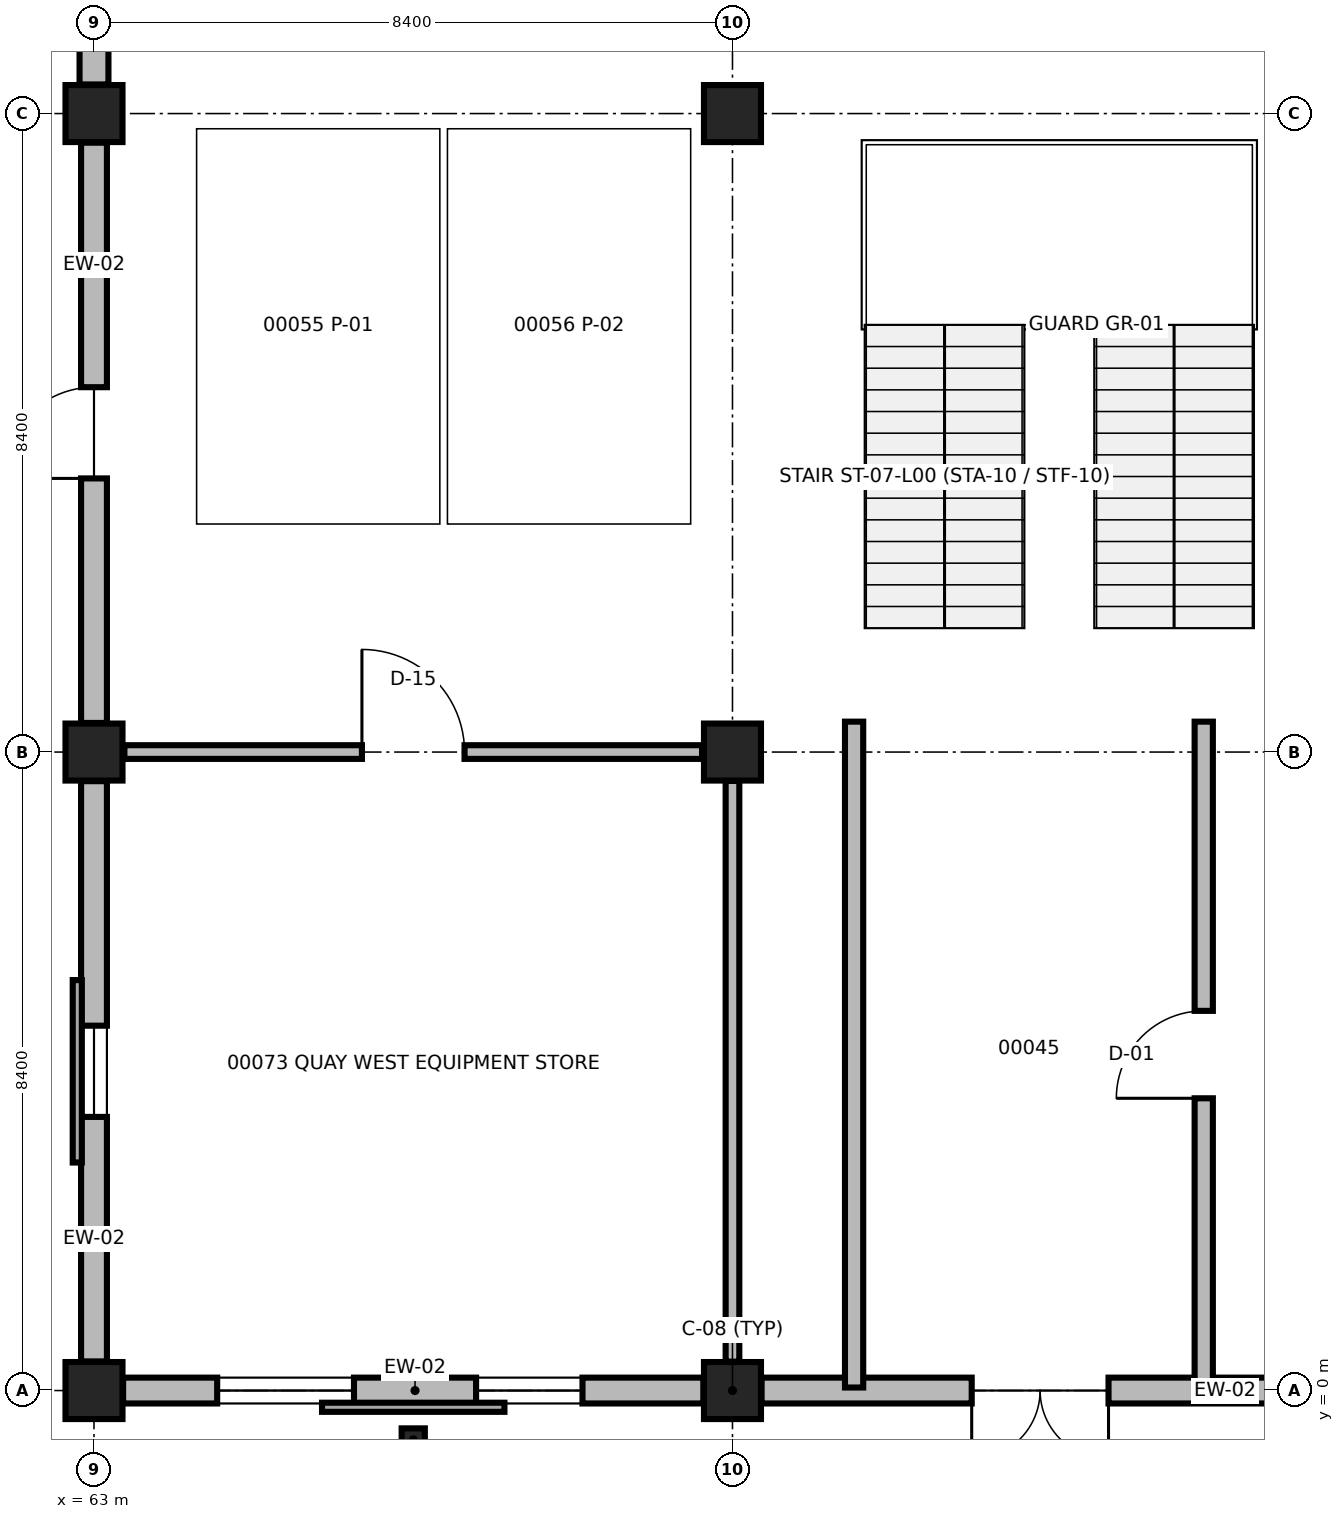
"""IFC4 building model, lengths in metres.
Left out: names, types, materials, properties, quantities, classifications, styles, units other than length and angle.
Written with IfcOpenShell. Run it as: python <this file> out.ifc"""

import sys

from ifc_helpers import new_model, si_unit, direction, frame, frame_2d, origin, origin_2d, place, context, subcontext, project, spatial, rectangle, hollow_rectangle, extrude, element, fill, save


model = new_model("IFC4")
c1 = context("Model", 3, precision=1e-05, world=origin(), true_north=direction((0.0, 1.0)))
c2 = subcontext(c1, "Body", "Model", "MODEL_VIEW")
j1 = project(units=[si_unit("LENGTHUNIT", "METRE"), si_unit("PLANEANGLEUNIT", "RADIAN")], contexts=[c1])
p1 = place(None, origin())
s1 = spatial("IfcSite", under=j1, at=p1, CompositionType="ELEMENT")
p2 = place(p1, origin())
s2 = spatial("IfcBuilding", under=s1, at=p2, CompositionType="ELEMENT")
p3 = place(p2, origin())
s3 = spatial("IfcBuildingStorey", under=s2, at=p3, CompositionType="ELEMENT", Elevation=0.0)
for number, where, z_axis, x_axis in (
    (1, (63.0, 0.0, 0.0), (0.0, 0.0, 1.0), (1.0, 0.0, 0.0)),
    (2, (63.0, 8.4, 0.0), (0.0, 0.0, 1.0), (1.0, 0.0, 0.0)),
    (3, (63.0, 16.8, 0.0), (0.0, 0.0, 1.0), (1.0, 0.0, 0.0)),
    (4, (71.4, 0.0, 0.0), (0.0, 0.0, 1.0), (1.0, 0.0, 0.0)),
    (5, (71.4, 8.4, 0.0), (0.0, 0.0, 1.0), (1.0, 0.0, 0.0)),
    (6, (71.4, 16.8, 0.0), (0.0, 0.0, 1.0), (1.0, 0.0, 0.0)),
):
    element("IfcColumn", number, at=place(p3, frame(where, z_axis=z_axis, x_axis=x_axis)), inside=s3, PredefinedType="COLUMN", context=c2, shape_type="SweptSolid", body=[
        extrude(rectangle(XDim=0.75, YDim=0.75, at=origin_2d()), origin(), (0.0, 0.0, 1.0), 5.1),
    ])
p4 = place(p3, frame((67.2, -0.65, 0.0), z_axis=(0.0, 0.0, 1.0), x_axis=(1.0, 0.0, 0.0)))
e7 = element("IfcColumn", 7, at=p4, inside=s3, PredefinedType="PILASTER", context=c2, shape_type="SweptSolid", body=[
    extrude(hollow_rectangle(XDim=0.305, YDim=0.305, WallThickness=0.015, at=origin_2d()), origin(), (0.0, 0.0, 1.0), 5.1),
])
p5 = place(p3, frame((71.017, 0.0, 0.0), z_axis=(0.0, 0.0, 1.0), x_axis=(-1.0, 0.0, 0.0)))
e8 = element("IfcWall", 8, at=p5, inside=s3, PredefinedType="SOLIDWALL", context=c2, shape_type="SweptSolid", body=[
    extrude(rectangle(XDim=7.634, YDim=0.34, at=frame_2d((3.817, 0.0))), origin(), (0.0, 0.0, 1.0), 4.246),
])
p6 = place(p5, frame((1.59, 0.0, 1.3)))
e9 = element("IfcOpeningElement", 9, at=p6, cuts=e8, PredefinedType="OPENING", context=c2, shape_type="SweptSolid", body=[
    extrude(rectangle(XDim=1.4, YDim=1.45, at=frame_2d((0.7, 0.725))), frame((0.0, 0.18, 0.0), z_axis=(0.0, -1.0, 0.0), x_axis=(1.0, 0.0, 0.0)), (0.0, 0.0, 1.0), 0.36),
])
p7 = place(p5, frame((4.596, 0.0, 1.3)))
e10 = element("IfcOpeningElement", 10, at=p7, cuts=e8, PredefinedType="OPENING", context=c2, shape_type="SweptSolid", body=[
    extrude(rectangle(XDim=1.8, YDim=1.75, at=frame_2d((0.9, 0.875))), frame((0.0, 0.18, 0.0), z_axis=(0.0, -1.0, 0.0), x_axis=(1.0, 0.0, 0.0)), (0.0, 0.0, 1.0), 0.36),
])
p8 = place(p3, frame((79.417, 0.0, 0.0), z_axis=(0.0, 0.0, 1.0), x_axis=(-1.0, 0.0, 0.0)))
e11 = element("IfcWall", 11, at=p8, inside=s3, PredefinedType="SOLIDWALL", context=c2, shape_type="SweptSolid", body=[
    extrude(rectangle(XDim=7.634, YDim=0.34, at=frame_2d((3.817, 0.0))), origin(), (0.0, 0.0, 1.0), 4.226),
])
p9 = place(p8, frame((3.07, 0.0, 0.0)))
e12 = element("IfcOpeningElement", 12, at=p9, cuts=e11, PredefinedType="OPENING", context=c2, shape_type="SweptSolid", body=[
    extrude(rectangle(XDim=1.8, YDim=2.4, at=frame_2d((0.9, 1.2))), frame((0.0, 0.18, 0.0), z_axis=(0.0, -1.0, 0.0), x_axis=(1.0, 0.0, 0.0)), (0.0, 0.0, 1.0), 0.36),
])
p10 = place(p3, frame((63.0, 0.383, 0.0), z_axis=(0.0, 0.0, 1.0), x_axis=(0.0, 1.0, 0.0)))
e13 = element("IfcWall", 13, at=p10, inside=s3, PredefinedType="SOLIDWALL", context=c2, shape_type="SweptSolid", body=[
    extrude(rectangle(XDim=7.634, YDim=0.34, at=frame_2d((3.817, 0.0))), origin(), (0.0, 0.0, 1.0), 4.246),
])
p11 = place(p10, frame((3.217, 0.0, 1.25)))
e14 = element("IfcOpeningElement", 14, at=p11, cuts=e13, PredefinedType="OPENING", context=c2, shape_type="SweptSolid", body=[
    extrude(rectangle(XDim=1.2, YDim=1.75, at=frame_2d((0.6, 0.875))), frame((0.0, 0.18, 0.0), z_axis=(0.0, -1.0, 0.0), x_axis=(1.0, 0.0, 0.0)), (0.0, 0.0, 1.0), 0.36),
])
p12 = place(p3, frame((63.0, 8.783, 0.0), z_axis=(0.0, 0.0, 1.0), x_axis=(0.0, 1.0, 0.0)))
e15 = element("IfcWall", 15, at=p12, inside=s3, PredefinedType="SOLIDWALL", context=c2, shape_type="SweptSolid", body=[
    extrude(rectangle(XDim=7.634, YDim=0.34, at=frame_2d((3.817, 0.0))), origin(), (0.0, 0.0, 1.0), 4.246),
])
p13 = place(p12, frame((3.217, 0.0, 0.0)))
e16 = element("IfcOpeningElement", 16, at=p13, cuts=e15, PredefinedType="OPENING", context=c2, shape_type="SweptSolid", body=[
    extrude(rectangle(XDim=1.2, YDim=2.25, at=frame_2d((0.6, 1.125))), frame((0.0, 0.18, 0.0), z_axis=(0.0, -1.0, 0.0), x_axis=(1.0, 0.0, 0.0)), (0.0, 0.0, 1.0), 0.36),
])
p14 = place(p3, frame((63.0, 17.183, 0.0), z_axis=(0.0, 0.0, 1.0), x_axis=(0.0, 1.0, 0.0)))
e17 = element("IfcWall", 17, at=p14, inside=s3, PredefinedType="SOLIDWALL", context=c2, shape_type="SweptSolid", body=[
    extrude(rectangle(XDim=7.793, YDim=0.38, at=frame_2d((3.897, 0.0))), origin(), (0.0, 0.0, 1.0), 4.246),
])
p15 = place(p14, frame((1.297, 0.0, 0.0)))
e18 = element("IfcOpeningElement", 18, at=p15, cuts=e17, PredefinedType="OPENING", context=c2, shape_type="SweptSolid", body=[
    extrude(rectangle(XDim=5.2, YDim=3.85, at=frame_2d((2.6, 1.925))), frame((0.0, 0.2, 0.0), z_axis=(0.0, -1.0, 0.0), x_axis=(1.0, 0.0, 0.0)), (0.0, 0.0, 1.0), 0.4),
])
p16 = place(p3, frame((63.4, 8.4, 0.0), z_axis=(0.0, 0.0, 1.0), x_axis=(1.0, 0.0, 0.0)))
e19 = element("IfcWall", 19, at=p16, inside=s3, PredefinedType="PARTITIONING", context=c2, shape_type="SweptSolid", body=[
    extrude(rectangle(XDim=7.6, YDim=0.18, at=frame_2d((3.8, 0.0))), origin(), (0.0, 0.0, 1.0), 3.77),
])
p17 = place(p16, frame((3.125, 0.0, 0.0)))
e20 = element("IfcOpeningElement", 20, at=p17, cuts=e19, PredefinedType="OPENING", context=c2, shape_type="SweptSolid", body=[
    extrude(rectangle(XDim=1.35, YDim=2.2, at=frame_2d((0.675, 1.1))), frame((0.0, 0.1, 0.0), z_axis=(0.0, -1.0, 0.0), x_axis=(1.0, 0.0, 0.0)), (0.0, 0.0, 1.0), 0.2),
])
p18 = place(p3, frame((73.0, 0.04, 0.0), z_axis=(0.0, 0.0, 1.0), x_axis=(0.0, 1.0, 0.0)))
e21 = element("IfcWall", 21, at=p18, inside=s3, PredefinedType="SOLIDWALL", context=c2, shape_type="SweptSolid", body=[
    extrude(rectangle(XDim=8.76, YDim=0.24, at=frame_2d((4.38, 0.0))), origin(), (0.0, 0.0, 1.0), 3.77),
])
p19 = place(p3, frame((77.6, 0.04, 0.0), z_axis=(0.0, 0.0, 1.0), x_axis=(0.0, 1.0, 0.0)))
e22 = element("IfcWall", 22, at=p19, inside=s3, PredefinedType="SOLIDWALL", context=c2, shape_type="SweptSolid", body=[
    extrude(rectangle(XDim=8.76, YDim=0.24, at=frame_2d((4.38, 0.0))), origin(), (0.0, 0.0, 1.0), 3.77),
])
p20 = place(p19, frame((3.805, 0.0, 0.0)))
e23 = element("IfcOpeningElement", 23, at=p20, cuts=e22, PredefinedType="OPENING", context=c2, shape_type="SweptSolid", body=[
    extrude(rectangle(XDim=1.15, YDim=2.15, at=frame_2d((0.575, 1.075))), frame((0.0, 0.13, 0.0), z_axis=(0.0, -1.0, 0.0), x_axis=(1.0, 0.0, 0.0)), (0.0, 0.0, 1.0), 0.26),
])
p21 = place(p3, frame((71.4, 0.38, 0.0), z_axis=(0.0, 0.0, 1.0), x_axis=(0.0, 1.0, 0.0)))
e24 = element("IfcWall", 24, at=p21, inside=s3, PredefinedType="PARTITIONING", context=c2, shape_type="SweptSolid", body=[
    extrude(rectangle(XDim=7.64, YDim=0.18, at=frame_2d((3.82, 0.0))), origin(), (0.0, 0.0, 1.0), 4.226),
])
p22 = place(p6, origin())
e25 = element("IfcWindow", 25, at=p22, inside=s3, PartitioningType="SINGLE_PANEL", PredefinedType="WINDOW", context=c2, shape_type="SweptSolid", body=[
    extrude(rectangle(XDim=1.4, YDim=1.45, at=frame_2d((0.7, 0.725))), frame((0.0, 0.03, 0.0), z_axis=(0.0, -1.0, 0.0), x_axis=(1.0, 0.0, 0.0)), (0.0, 0.0, 1.0), 0.06),
])
fill(e9, e25)
p23 = place(p7, origin())
e26 = element("IfcWindow", 26, at=p23, inside=s3, PartitioningType="SINGLE_PANEL", PredefinedType="WINDOW", context=c2, shape_type="SweptSolid", body=[
    extrude(rectangle(XDim=1.8, YDim=1.75, at=frame_2d((0.9, 0.875))), frame((0.0, 0.03, 0.0), z_axis=(0.0, -1.0, 0.0), x_axis=(1.0, 0.0, 0.0)), (0.0, 0.0, 1.0), 0.06),
])
fill(e10, e26)
p24 = place(p9, origin())
e27 = element("IfcDoor", 27, at=p24, inside=s3, OperationType="DOUBLE_DOOR_SINGLE_SWING", PredefinedType="DOOR", context=c2, shape_type="SweptSolid", body=[
    extrude(rectangle(XDim=1.8, YDim=2.4, at=frame_2d((0.9, 1.2))), frame((0.0, 0.025, 0.0), z_axis=(0.0, -1.0, 0.0), x_axis=(1.0, 0.0, 0.0)), (0.0, 0.0, 1.0), 0.05),
])
fill(e12, e27)
p25 = place(p11, origin())
e28 = element("IfcWindow", 28, at=p25, inside=s3, PartitioningType="SINGLE_PANEL", PredefinedType="WINDOW", context=c2, shape_type="SweptSolid", body=[
    extrude(rectangle(XDim=1.2, YDim=1.75, at=frame_2d((0.6, 0.875))), frame((0.0, 0.03, 0.0), z_axis=(0.0, -1.0, 0.0), x_axis=(1.0, 0.0, 0.0)), (0.0, 0.0, 1.0), 0.06),
])
fill(e14, e28)
p26 = place(p13, origin())
e29 = element("IfcDoor", 29, at=p26, inside=s3, OperationType="SINGLE_SWING_LEFT", PredefinedType="DOOR", context=c2, shape_type="SweptSolid", body=[
    extrude(rectangle(XDim=1.2, YDim=2.25, at=frame_2d((0.6, 1.125))), frame((0.0, 0.025, 0.0), z_axis=(0.0, -1.0, 0.0), x_axis=(1.0, 0.0, 0.0)), (0.0, 0.0, 1.0), 0.05),
])
fill(e16, e29)
p27 = place(p17, frame((1.35, 0.0, 0.0), z_axis=(0.0, 0.0, 1.0), x_axis=(-1.0, 0.0, 0.0)))
e30 = element("IfcDoor", 30, at=p27, inside=s3, OperationType="SINGLE_SWING_RIGHT", PredefinedType="DOOR", context=c2, shape_type="SweptSolid", body=[
    extrude(rectangle(XDim=1.35, YDim=2.2, at=frame_2d((0.675, 1.1))), frame((0.0, 0.025, 0.0), z_axis=(0.0, -1.0, 0.0), x_axis=(1.0, 0.0, 0.0)), (0.0, 0.0, 1.0), 0.05),
])
fill(e20, e30)
p28 = place(p20, origin())
e31 = element("IfcDoor", 31, at=p28, inside=s3, OperationType="SINGLE_SWING_LEFT", PredefinedType="DOOR", context=c2, shape_type="SweptSolid", body=[
    extrude(rectangle(XDim=1.15, YDim=2.15, at=frame_2d((0.575, 1.075))), frame((0.0, 0.025, 0.0), z_axis=(0.0, -1.0, 0.0), x_axis=(1.0, 0.0, 0.0)), (0.0, 0.0, 1.0), 0.05),
])
fill(e23, e31)
save(model, sys.argv[1])
